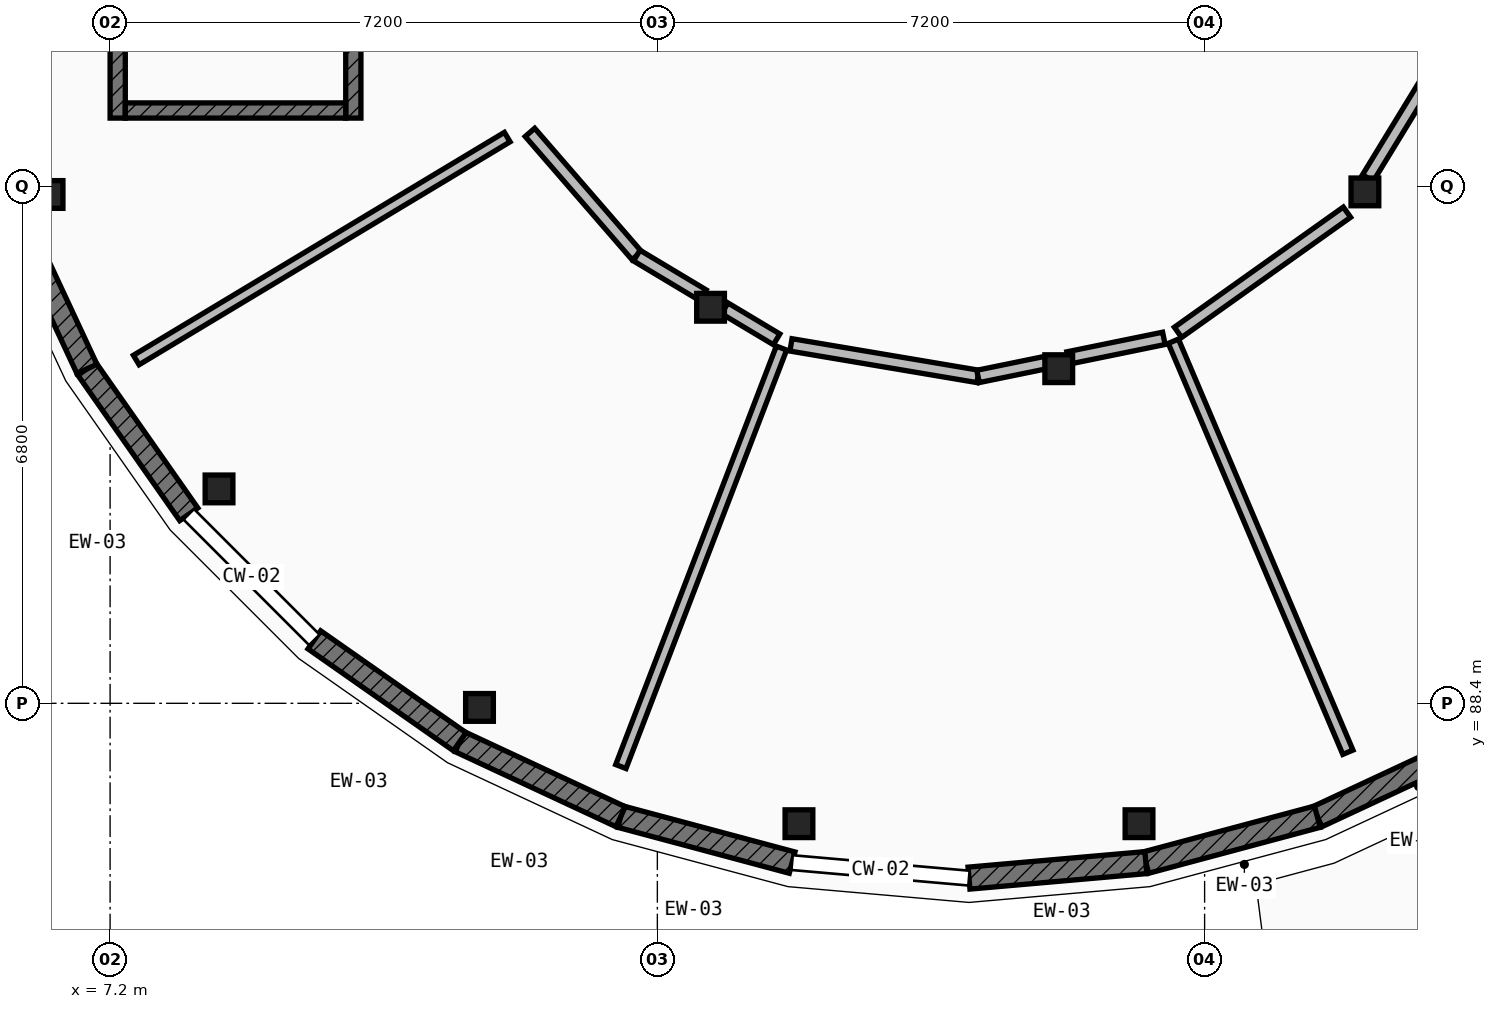
"""IFC4 building model, lengths in metres.
Left out: names, types, materials, properties, quantities, classifications, styles, units other than length and angle.
Written with IfcOpenShell. Run it as: python <this file> out.ifc"""

import sys

from ifc_helpers import new_model, si_unit, direction, frame, frame_2d, origin, origin_2d, place, context, subcontext, project, spatial, rectangle, extrude, element, fill, save


model = new_model("IFC4")
c1 = context("Model", 3, precision=1e-05, world=origin(), true_north=direction((0.0, 1.0)))
c2 = subcontext(c1, "Body", "Model", "MODEL_VIEW")
j1 = project(units=[si_unit("LENGTHUNIT", "METRE"), si_unit("PLANEANGLEUNIT", "RADIAN")], contexts=[c1])
p1 = place(None, origin())
s1 = spatial("IfcSite", under=j1, at=p1, CompositionType="ELEMENT")
p2 = place(p1, origin())
s2 = spatial("IfcBuilding", under=s1, at=p2, CompositionType="ELEMENT")
p3 = place(p2, frame((0.0, 0.0, 8.75)))
s3 = spatial("IfcBuildingStorey", under=s2, at=p3, CompositionType="ELEMENT", Elevation=8.75)
for number, where, z_axis, x_axis in (
    (1, (6.397, 95.095, 0.0), (0.0, 0.0, 1.0), (1.0, 0.0, 0.0)),
    (2, (8.633, 91.221, 0.0), (0.0, 0.0, 1.0), (1.0, 0.0, 0.0)),
    (3, (12.06, 88.346, 0.0), (0.0, 0.0, 1.0), (1.0, 0.0, 0.0)),
    (4, (16.263, 86.816, 0.0), (0.0, 0.0, 1.0), (1.0, 0.0, 0.0)),
    (5, (20.737, 86.816, 0.0), (0.0, 0.0, 1.0), (1.0, 0.0, 0.0)),
    (6, (15.1, 93.611, 0.0), (0.0, 0.0, 1.0), (1.0, 0.0, 0.0)),
    (7, (19.681, 92.803, 0.0), (0.0, 0.0, 1.0), (1.0, 0.0, 0.0)),
    (8, (23.709, 95.129, 0.0), (0.0, 0.0, 1.0), (1.0, 0.0, 0.0)),
):
    element("IfcColumn", number, at=place(p3, frame(where, z_axis=z_axis, x_axis=x_axis)), inside=s3, PredefinedType="COLUMN", context=c2, shape_type="SweptSolid", body=[
        extrude(rectangle(XDim=0.365, YDim=0.365, at=origin_2d()), origin(), (0.0, 0.0, 1.0), 4.2),
    ])
p4 = place(p3, frame((25.2, 87.895, 0.0), z_axis=(0.0, 0.0, 1.0), x_axis=(-0.906321946979, -0.422587894318, 0.0)))
e9 = element("IfcWall", 9, at=p4, inside=s3, PredefinedType="ELEMENTEDWALL", context=c2, shape_type="SweptSolid", body=[
    extrude(rectangle(XDim=2.336, YDim=0.29, at=frame_2d((1.168, 0.0))), origin(), (0.0, 0.0, 1.0), 3.329),
])
p5 = place(p4, frame((0.418, 0.0, 0.85)))
e10 = element("IfcOpeningElement", 10, at=p5, cuts=e9, PredefinedType="OPENING", context=c2, shape_type="SweptSolid", body=[
    extrude(rectangle(XDim=1.5, YDim=1.95, at=frame_2d((0.75, 0.975))), frame((0.0, 0.155, 0.0), z_axis=(0.0, -1.0, 0.0), x_axis=(1.0, 0.0, 0.0)), (0.0, 0.0, 1.0), 0.31),
])
p6 = place(p3, frame((23.083, 86.908, 0.0), z_axis=(0.0, 0.0, 1.0), x_axis=(-0.965981166673, -0.258612423585, 0.0)))
e11 = element("IfcWall", 11, at=p6, inside=s3, PredefinedType="ELEMENTEDWALL", context=c2, shape_type="SweptSolid", body=[
    extrude(rectangle(XDim=2.335, YDim=0.29, at=frame_2d((1.168, 0.0))), origin(), (0.0, 0.0, 1.0), 3.329),
])
p7 = place(p6, frame((0.393, 0.0, 0.85)))
e12 = element("IfcOpeningElement", 12, at=p7, cuts=e11, PredefinedType="OPENING", context=c2, shape_type="SweptSolid", body=[
    extrude(rectangle(XDim=1.55, YDim=1.5, at=frame_2d((0.775, 0.75))), frame((0.0, 0.155, 0.0), z_axis=(0.0, -1.0, 0.0), x_axis=(1.0, 0.0, 0.0)), (0.0, 0.0, 1.0), 0.31),
])
p8 = place(p3, frame((20.827, 86.304, 0.0), z_axis=(0.0, 0.0, 1.0), x_axis=(-0.996184295282, -0.087274565792, 0.0)))
e13 = element("IfcWall", 13, at=p8, inside=s3, PredefinedType="ELEMENTEDWALL", context=c2, shape_type="SweptSolid", body=[
    extrude(rectangle(XDim=2.336, YDim=0.29, at=frame_2d((1.168, 0.0))), origin(), (0.0, 0.0, 1.0), 3.329),
])
p9 = place(p8, frame((0.393, 0.0, 0.85)))
e14 = element("IfcOpeningElement", 14, at=p9, cuts=e13, PredefinedType="OPENING", context=c2, shape_type="SweptSolid", body=[
    extrude(rectangle(XDim=1.55, YDim=1.8, at=frame_2d((0.775, 0.9))), frame((0.0, 0.155, 0.0), z_axis=(0.0, -1.0, 0.0), x_axis=(1.0, 0.0, 0.0)), (0.0, 0.0, 1.0), 0.31),
])
p10 = place(p3, frame((16.173, 86.304, 0.0), z_axis=(0.0, 0.0, 1.0), x_axis=(-0.965981166673, 0.258612423585, 0.0)))
e15 = element("IfcWall", 15, at=p10, inside=s3, PredefinedType="ELEMENTEDWALL", context=c2, shape_type="SweptSolid", body=[
    extrude(rectangle(XDim=2.335, YDim=0.29, at=frame_2d((1.168, 0.0))), origin(), (0.0, 0.0, 1.0), 3.329),
])
p11 = place(p10, frame((0.368, 0.0, 0.85)))
e16 = element("IfcOpeningElement", 16, at=p11, cuts=e15, PredefinedType="OPENING", context=c2, shape_type="SweptSolid", body=[
    extrude(rectangle(XDim=1.6, YDim=1.55, at=frame_2d((0.8, 0.775))), frame((0.0, 0.155, 0.0), z_axis=(0.0, -1.0, 0.0), x_axis=(1.0, 0.0, 0.0)), (0.0, 0.0, 1.0), 0.31),
])
p12 = place(p3, frame((13.917, 86.908, 0.0), z_axis=(0.0, 0.0, 1.0), x_axis=(-0.906321946979, 0.422587894318, 0.0)))
e17 = element("IfcWall", 17, at=p12, inside=s3, PredefinedType="ELEMENTEDWALL", context=c2, shape_type="SweptSolid", body=[
    extrude(rectangle(XDim=2.336, YDim=0.29, at=frame_2d((1.168, 0.0))), origin(), (0.0, 0.0, 1.0), 3.329),
])
p13 = place(p12, frame((0.368, 0.0, 0.85)))
e18 = element("IfcOpeningElement", 18, at=p13, cuts=e17, PredefinedType="OPENING", context=c2, shape_type="SweptSolid", body=[
    extrude(rectangle(XDim=1.6, YDim=1.85, at=frame_2d((0.8, 0.925))), frame((0.0, 0.155, 0.0), z_axis=(0.0, -1.0, 0.0), x_axis=(1.0, 0.0, 0.0)), (0.0, 0.0, 1.0), 0.31),
])
p14 = place(p3, frame((11.8, 87.895, 0.0), z_axis=(0.0, 0.0, 1.0), x_axis=(-0.819045278347, 0.573728883722, 0.0)))
e19 = element("IfcWall", 19, at=p14, inside=s3, PredefinedType="ELEMENTEDWALL", context=c2, shape_type="SweptSolid", body=[
    extrude(rectangle(XDim=2.336, YDim=0.29, at=frame_2d((1.168, 0.0))), origin(), (0.0, 0.0, 1.0), 3.329),
])
p15 = place(p14, frame((0.758, 0.0, 0.85)))
e20 = element("IfcOpeningElement", 20, at=p15, cuts=e19, PredefinedType="OPENING", context=c2, shape_type="SweptSolid", body=[
    extrude(rectangle(XDim=0.82, YDim=1.45, at=frame_2d((0.41, 0.725))), frame((0.0, 0.155, 0.0), z_axis=(0.0, -1.0, 0.0), x_axis=(1.0, 0.0, 0.0)), (0.0, 0.0, 1.0), 0.31),
])
p16 = place(p3, frame((8.235, 90.887, 0.0), z_axis=(0.0, 0.0, 1.0), x_axis=(-0.573728883722, 0.819045278347, 0.0)))
e21 = element("IfcWall", 21, at=p16, inside=s3, PredefinedType="ELEMENTEDWALL", context=c2, shape_type="SweptSolid", body=[
    extrude(rectangle(XDim=2.336, YDim=0.29, at=frame_2d((1.168, 0.0))), origin(), (0.0, 0.0, 1.0), 3.329),
])
p17 = place(p16, frame((0.743, 0.0, 0.85)))
e22 = element("IfcOpeningElement", 22, at=p17, cuts=e21, PredefinedType="OPENING", context=c2, shape_type="SweptSolid", body=[
    extrude(rectangle(XDim=0.85, YDim=1.5, at=frame_2d((0.425, 0.75))), frame((0.0, 0.155, 0.0), z_axis=(0.0, -1.0, 0.0), x_axis=(1.0, 0.0, 0.0)), (0.0, 0.0, 1.0), 0.31),
])
p18 = place(p3, frame((6.895, 92.8, 0.0), z_axis=(0.0, 0.0, 1.0), x_axis=(-0.422587894318, 0.906321946979, 0.0)))
e23 = element("IfcWall", 23, at=p18, inside=s3, PredefinedType="ELEMENTEDWALL", context=c2, shape_type="SweptSolid", body=[
    extrude(rectangle(XDim=2.336, YDim=0.29, at=frame_2d((1.168, 0.0))), origin(), (0.0, 0.0, 1.0), 3.329),
])
p19 = place(p18, frame((0.743, 0.0, 0.85)))
e24 = element("IfcOpeningElement", 24, at=p19, cuts=e23, PredefinedType="OPENING", context=c2, shape_type="SweptSolid", body=[
    extrude(rectangle(XDim=0.85, YDim=1.75, at=frame_2d((0.425, 0.875))), frame((0.0, 0.155, 0.0), z_axis=(0.0, -1.0, 0.0), x_axis=(1.0, 0.0, 0.0)), (0.0, 0.0, 1.0), 0.31),
])
p20 = place(p3, frame((10.4, 96.1, 0.0), z_axis=(0.0, 0.0, 1.0), x_axis=(0.0, 1.0, 0.0)))
e25 = element("IfcWall", 25, at=p20, inside=s3, PredefinedType="SHEAR", context=c2, shape_type="SweptSolid", body=[
    extrude(rectangle(XDim=6.8, YDim=0.2, at=frame_2d((3.4, 0.0))), origin(), (0.0, 0.0, 1.0), 3.975),
])
p21 = place(p20, frame((0.38, 0.0, 0.0)))
e26 = element("IfcOpeningElement", 26, at=p21, cuts=e25, PredefinedType="OPENING", context=c2, shape_type="SweptSolid", body=[
    extrude(rectangle(XDim=1.05, YDim=2.15, at=frame_2d((0.525, 1.075))), frame((0.0, 0.11, 0.0), z_axis=(0.0, -1.0, 0.0), x_axis=(1.0, 0.0, 0.0)), (0.0, 0.0, 1.0), 0.22),
])
p22 = place(p3, frame((7.3, 96.1, 0.0), z_axis=(0.0, 0.0, 1.0), x_axis=(0.0, 1.0, 0.0)))
e27 = element("IfcWall", 27, at=p22, inside=s3, PredefinedType="SHEAR", context=c2, shape_type="SweptSolid", body=[
    extrude(rectangle(XDim=6.8, YDim=0.2, at=frame_2d((3.4, 0.0))), origin(), (0.0, 0.0, 1.0), 3.975),
])
p23 = place(p3, frame((10.3, 96.2, 0.0), z_axis=(0.0, 0.0, 1.0), x_axis=(-1.0, 0.0, 0.0)))
e28 = element("IfcWall", 28, at=p23, inside=s3, PredefinedType="SHEAR", context=c2, shape_type="SweptSolid", body=[
    extrude(rectangle(XDim=2.9, YDim=0.2, at=frame_2d((1.45, 0.0))), origin(), (0.0, 0.0, 1.0), 3.975),
])
p24 = place(p3, frame((12.425, 95.85, 0.0), z_axis=(0.0, 0.0, 1.0), x_axis=(-0.857148493381, -0.515069374255, 0.0)))
e29 = element("IfcWall", 29, at=p24, inside=s3, PredefinedType="PARTITIONING", context=c2, shape_type="SweptSolid", body=[
    extrude(rectangle(XDim=5.695, YDim=0.145, at=frame_2d((2.847, 0.0))), origin(), (0.0, 0.0, 1.0), 3.304),
])
p25 = place(p3, frame((16.033, 93.074, 0.0), z_axis=(0.0, 0.0, 1.0), x_axis=(-0.35829933208, -0.933606763381, 0.0)))
e30 = element("IfcWall", 30, at=p25, inside=s3, PredefinedType="PARTITIONING", context=c2, shape_type="SweptSolid", body=[
    extrude(rectangle(XDim=5.897, YDim=0.145, at=frame_2d((2.949, 0.0))), origin(), (0.0, 0.0, 1.0), 3.304),
])
p26 = place(p3, frame((21.189, 93.164, 0.0), z_axis=(0.0, 0.0, 1.0), x_axis=(0.390817685438, -0.920468107404, 0.0)))
e31 = element("IfcWall", 31, at=p26, inside=s3, PredefinedType="PARTITIONING", context=c2, shape_type="SweptSolid", body=[
    extrude(rectangle(XDim=5.875, YDim=0.145, at=frame_2d((2.938, 0.0))), origin(), (0.0, 0.0, 1.0), 3.304),
])
p27 = place(p3, frame((12.724, 95.912, 0.0), z_axis=(0.0, 0.0, 1.0), x_axis=(0.654887207042, -0.755726634473, 0.0)))
e32 = element("IfcWall", 32, at=p27, inside=s3, PredefinedType="PARTITIONING", context=c2, shape_type="SweptSolid", body=[
    extrude(rectangle(XDim=2.145, YDim=0.165, at=frame_2d((1.073, 0.0))), origin(), (0.0, 0.0, 1.0), 3.304),
])
p28 = place(p27, frame((0.488, 0.0, 0.0)))
e33 = element("IfcOpeningElement", 33, at=p28, cuts=e32, PredefinedType="OPENING", context=c2, shape_type="SweptSolid", body=[
    extrude(rectangle(XDim=1.17, YDim=2.24, at=frame_2d((0.585, 1.12))), frame((0.0, 0.093, 0.0), z_axis=(0.0, -1.0, 0.0), x_axis=(1.0, 0.0, 0.0)), (0.0, 0.0, 1.0), 0.185),
])
p29 = place(p3, frame((14.129, 94.291, 0.0), z_axis=(0.0, 0.0, 1.0), x_axis=(0.857789762301, -0.51400070398, 0.0)))
e34 = element("IfcWall", 34, at=p29, inside=s3, PredefinedType="PARTITIONING", context=c2, shape_type="SweptSolid", body=[
    extrude(rectangle(XDim=1.016, YDim=0.165, at=frame_2d((0.508, 0.0))), origin(), (0.0, 0.0, 1.0), 3.304),
])
p30 = place(p3, frame((15.287, 93.597, 0.0), z_axis=(0.0, 0.0, 1.0), x_axis=(0.858142882263, -0.513410940301, 0.0)))
e35 = element("IfcWall", 35, at=p30, inside=s3, PredefinedType="PARTITIONING", context=c2, shape_type="SweptSolid", body=[
    extrude(rectangle(XDim=0.795, YDim=0.165, at=frame_2d((0.397, 0.0))), origin(), (0.0, 0.0, 1.0), 3.304),
])
p31 = place(p3, frame((16.158, 93.116, 0.0), z_axis=(0.0, 0.0, 1.0), x_axis=(0.986074817065, -0.166302300497, 0.0)))
e36 = element("IfcWall", 36, at=p31, inside=s3, PredefinedType="PARTITIONING", context=c2, shape_type="SweptSolid", body=[
    extrude(rectangle(XDim=2.496, YDim=0.165, at=frame_2d((1.248, 0.0))), origin(), (0.0, 0.0, 1.0), 3.304),
])
p32 = place(p31, frame((0.653, 0.0, 0.0)))
e37 = element("IfcOpeningElement", 37, at=p32, cuts=e36, PredefinedType="OPENING", context=c2, shape_type="SweptSolid", body=[
    extrude(rectangle(XDim=1.19, YDim=2.26, at=frame_2d((0.595, 1.13))), frame((0.0, 0.093, 0.0), z_axis=(0.0, -1.0, 0.0), x_axis=(1.0, 0.0, 0.0)), (0.0, 0.0, 1.0), 0.185),
])
p33 = place(p3, frame((18.619, 92.701, 0.0), z_axis=(0.0, 0.0, 1.0), x_axis=(0.979621619883, 0.200851890353, 0.0)))
e38 = element("IfcWall", 38, at=p33, inside=s3, PredefinedType="PARTITIONING", context=c2, shape_type="SweptSolid", body=[
    extrude(rectangle(XDim=0.912, YDim=0.165, at=frame_2d((0.456, 0.0))), origin(), (0.0, 0.0, 1.0), 3.304),
])
p34 = place(p3, frame((19.804, 92.944, 0.0), z_axis=(0.0, 0.0, 1.0), x_axis=(0.97970222492, 0.200458351001, 0.0)))
e39 = element("IfcWall", 39, at=p34, inside=s3, PredefinedType="PARTITIONING", context=c2, shape_type="SweptSolid", body=[
    extrude(rectangle(XDim=1.286, YDim=0.165, at=frame_2d((0.643, 0.0))), origin(), (0.0, 0.0, 1.0), 3.304),
])
p35 = place(p3, frame((21.25, 93.281, 0.0), z_axis=(0.0, 0.0, 1.0), x_axis=(0.814898961152, 0.579603039255, 0.0)))
e40 = element("IfcWall", 40, at=p35, inside=s3, PredefinedType="PARTITIONING", context=c2, shape_type="SweptSolid", body=[
    extrude(rectangle(XDim=2.728, YDim=0.165, at=frame_2d((1.364, 0.0))), origin(), (0.0, 0.0, 1.0), 3.304),
])
p36 = place(p35, frame((0.759, 0.0, 0.0)))
e41 = element("IfcOpeningElement", 41, at=p36, cuts=e40, PredefinedType="OPENING", context=c2, shape_type="SweptSolid", body=[
    extrude(rectangle(XDim=1.21, YDim=2.16, at=frame_2d((0.605, 1.08))), frame((0.0, 0.093, 0.0), z_axis=(0.0, -1.0, 0.0), x_axis=(1.0, 0.0, 0.0)), (0.0, 0.0, 1.0), 0.185),
])
p37 = place(p3, frame((23.748, 95.312, 0.0), z_axis=(0.0, 0.0, 1.0), x_axis=(0.521360305461, 0.853336646283, 0.0)))
e42 = element("IfcWall", 42, at=p37, inside=s3, PredefinedType="PARTITIONING", context=c2, shape_type="SweptSolid", body=[
    extrude(rectangle(XDim=2.202, YDim=0.165, at=frame_2d((1.101, 0.0))), origin(), (0.0, 0.0, 1.0), 3.304),
])
p38 = place(p5, origin())
e43 = element("IfcWindow", 43, at=p38, inside=s3, PartitioningType="SINGLE_PANEL", PredefinedType="WINDOW", context=c2, shape_type="SweptSolid", body=[
    extrude(rectangle(XDim=1.5, YDim=1.95, at=frame_2d((0.75, 0.975))), frame((0.0, 0.03, 0.0), z_axis=(0.0, -1.0, 0.0), x_axis=(1.0, 0.0, 0.0)), (0.0, 0.0, 1.0), 0.06),
])
fill(e10, e43)
p39 = place(p7, origin())
e44 = element("IfcWindow", 44, at=p39, inside=s3, PartitioningType="SINGLE_PANEL", PredefinedType="WINDOW", context=c2, shape_type="SweptSolid", body=[
    extrude(rectangle(XDim=1.55, YDim=1.5, at=frame_2d((0.775, 0.75))), frame((0.0, 0.03, 0.0), z_axis=(0.0, -1.0, 0.0), x_axis=(1.0, 0.0, 0.0)), (0.0, 0.0, 1.0), 0.06),
])
fill(e12, e44)
p40 = place(p9, origin())
e45 = element("IfcWindow", 45, at=p40, inside=s3, PartitioningType="SINGLE_PANEL", PredefinedType="WINDOW", context=c2, shape_type="SweptSolid", body=[
    extrude(rectangle(XDim=1.55, YDim=1.8, at=frame_2d((0.775, 0.9))), frame((0.0, 0.03, 0.0), z_axis=(0.0, -1.0, 0.0), x_axis=(1.0, 0.0, 0.0)), (0.0, 0.0, 1.0), 0.06),
])
fill(e14, e45)
p41 = place(p11, origin())
e46 = element("IfcWindow", 46, at=p41, inside=s3, PartitioningType="SINGLE_PANEL", PredefinedType="WINDOW", context=c2, shape_type="SweptSolid", body=[
    extrude(rectangle(XDim=1.6, YDim=1.55, at=frame_2d((0.8, 0.775))), frame((0.0, 0.03, 0.0), z_axis=(0.0, -1.0, 0.0), x_axis=(1.0, 0.0, 0.0)), (0.0, 0.0, 1.0), 0.06),
])
fill(e16, e46)
p42 = place(p13, origin())
e47 = element("IfcWindow", 47, at=p42, inside=s3, PartitioningType="SINGLE_PANEL", PredefinedType="WINDOW", context=c2, shape_type="SweptSolid", body=[
    extrude(rectangle(XDim=1.6, YDim=1.85, at=frame_2d((0.8, 0.925))), frame((0.0, 0.03, 0.0), z_axis=(0.0, -1.0, 0.0), x_axis=(1.0, 0.0, 0.0)), (0.0, 0.0, 1.0), 0.06),
])
fill(e18, e47)
p43 = place(p15, origin())
e48 = element("IfcWindow", 48, at=p43, inside=s3, PartitioningType="SINGLE_PANEL", PredefinedType="WINDOW", context=c2, shape_type="SweptSolid", body=[
    extrude(rectangle(XDim=0.82, YDim=1.45, at=frame_2d((0.41, 0.725))), frame((0.0, 0.03, 0.0), z_axis=(0.0, -1.0, 0.0), x_axis=(1.0, 0.0, 0.0)), (0.0, 0.0, 1.0), 0.06),
])
fill(e20, e48)
p44 = place(p17, origin())
e49 = element("IfcWindow", 49, at=p44, inside=s3, PartitioningType="SINGLE_PANEL", PredefinedType="WINDOW", context=c2, shape_type="SweptSolid", body=[
    extrude(rectangle(XDim=0.85, YDim=1.5, at=frame_2d((0.425, 0.75))), frame((0.0, 0.03, 0.0), z_axis=(0.0, -1.0, 0.0), x_axis=(1.0, 0.0, 0.0)), (0.0, 0.0, 1.0), 0.06),
])
fill(e22, e49)
p45 = place(p19, origin())
e50 = element("IfcWindow", 50, at=p45, inside=s3, PartitioningType="SINGLE_PANEL", PredefinedType="WINDOW", context=c2, shape_type="SweptSolid", body=[
    extrude(rectangle(XDim=0.85, YDim=1.75, at=frame_2d((0.425, 0.875))), frame((0.0, 0.03, 0.0), z_axis=(0.0, -1.0, 0.0), x_axis=(1.0, 0.0, 0.0)), (0.0, 0.0, 1.0), 0.06),
])
fill(e24, e50)
p46 = place(p21, origin())
e51 = element("IfcDoor", 51, at=p46, inside=s3, OperationType="SINGLE_SWING_LEFT", PredefinedType="DOOR", context=c2, shape_type="SweptSolid", body=[
    extrude(rectangle(XDim=1.05, YDim=2.15, at=frame_2d((0.525, 1.075))), frame((0.0, 0.025, 0.0), z_axis=(0.0, -1.0, 0.0), x_axis=(1.0, 0.0, 0.0)), (0.0, 0.0, 1.0), 0.05),
])
fill(e26, e51)
p47 = place(p28, origin())
e52 = element("IfcDoor", 52, at=p47, inside=s3, OperationType="SINGLE_SWING_LEFT", PredefinedType="DOOR", context=c2, shape_type="SweptSolid", body=[
    extrude(rectangle(XDim=1.17, YDim=2.24, at=frame_2d((0.585, 1.12))), frame((0.0, 0.025, 0.0), z_axis=(0.0, -1.0, 0.0), x_axis=(1.0, 0.0, 0.0)), (0.0, 0.0, 1.0), 0.05),
])
fill(e33, e52)
p48 = place(p32, origin())
e53 = element("IfcDoor", 53, at=p48, inside=s3, OperationType="SINGLE_SWING_RIGHT", PredefinedType="DOOR", context=c2, shape_type="SweptSolid", body=[
    extrude(rectangle(XDim=1.19, YDim=2.26, at=frame_2d((0.595, 1.13))), frame((0.0, 0.025, 0.0), z_axis=(0.0, -1.0, 0.0), x_axis=(1.0, 0.0, 0.0)), (0.0, 0.0, 1.0), 0.05),
])
fill(e37, e53)
p49 = place(p36, origin())
e54 = element("IfcDoor", 54, at=p49, inside=s3, OperationType="SINGLE_SWING_LEFT", PredefinedType="DOOR", context=c2, shape_type="SweptSolid", body=[
    extrude(rectangle(XDim=1.21, YDim=2.16, at=frame_2d((0.605, 1.08))), frame((0.0, 0.025, 0.0), z_axis=(0.0, -1.0, 0.0), x_axis=(1.0, 0.0, 0.0)), (0.0, 0.0, 1.0), 0.05),
])
fill(e41, e54)
save(model, sys.argv[1])
